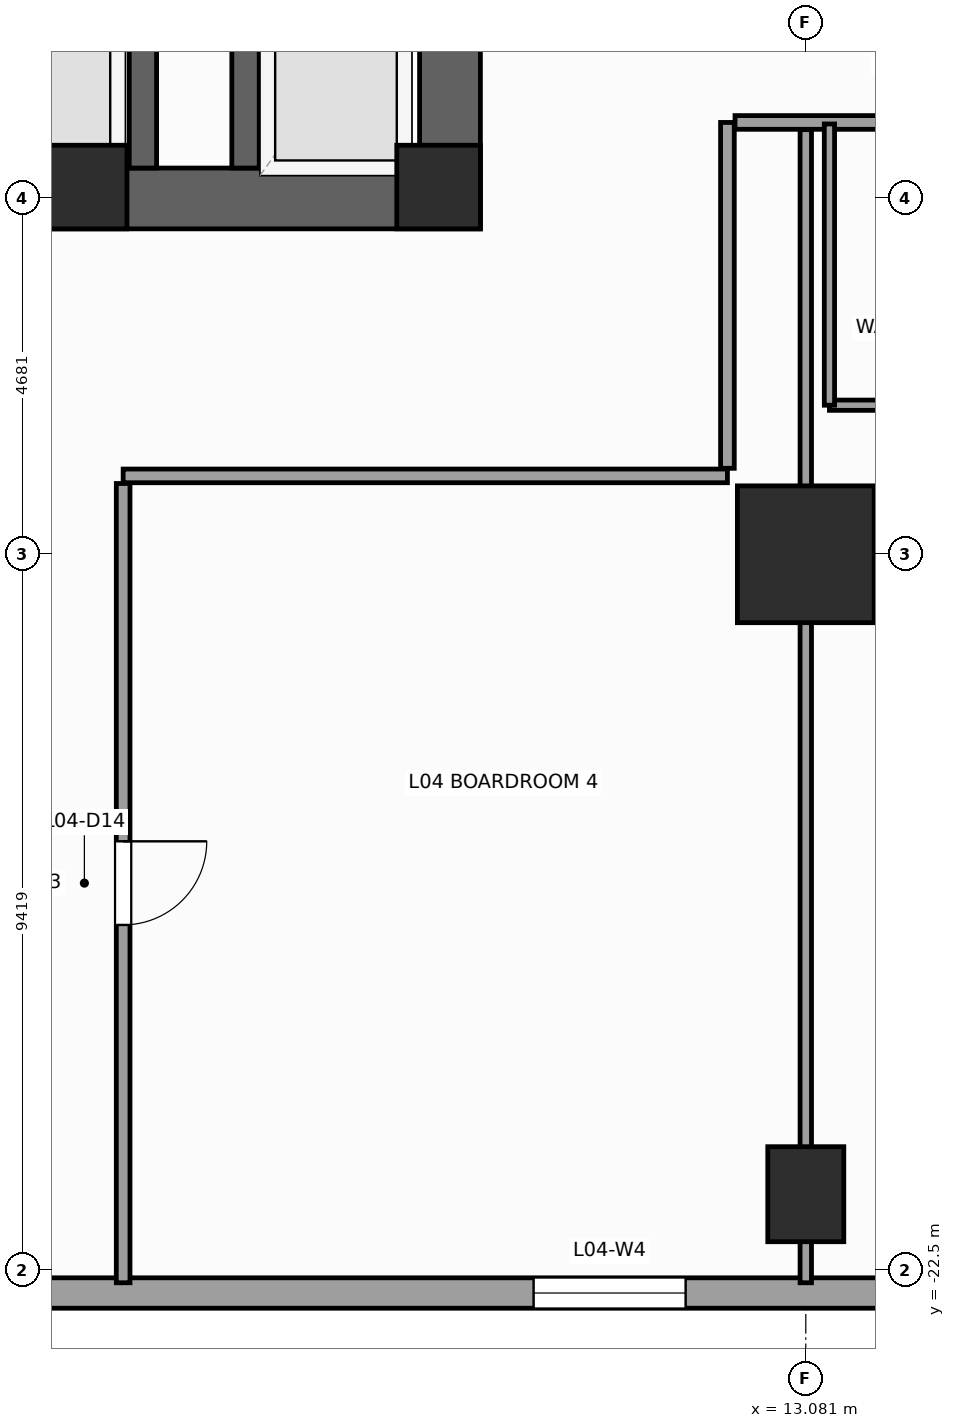
"""IFC4 building model, lengths in metres.
Left out: names, types, materials, properties, quantities, classifications, styles, units other than length and angle.
Written with IfcOpenShell. Run it as: python <this file> out.ifc"""

import sys

from ifc_helpers import new_model, si_unit, direction, frame, frame_2d, origin, origin_2d, place, context, subcontext, project, spatial, rectangle, extrude, source, transform, mapped, element, fill, save


model = new_model("IFC4")
c1 = context("Model", 3, precision=1e-05, world=origin(), true_north=direction((0.0, 1.0)))
c2 = subcontext(c1, "Body", "Model", "MODEL_VIEW")
j1 = project(units=[si_unit("LENGTHUNIT", "METRE"), si_unit("PLANEANGLEUNIT", "RADIAN")], contexts=[c1])
p1 = place(None, origin())
s1 = spatial("IfcSite", under=j1, at=p1, CompositionType="ELEMENT")
p2 = place(p1, origin())
s2 = spatial("IfcBuilding", under=s1, at=p2, CompositionType="ELEMENT")
p3 = place(p2, frame((0.0, 0.0, 21.0)))
s3 = spatial("IfcBuildingStorey", under=s2, at=p3, CompositionType="ELEMENT", Elevation=21.0)
p4 = place(p3, frame((-8.8, -8.4, 0.0), z_axis=(0.0, 0.0, 1.0), x_axis=(1.0, 0.0, 0.0)))
e1 = element("IfcWall", 1, at=p4, inside=s3, PredefinedType="SHEAR", context=c2, shape_type="SweptSolid", body=[
    extrude(rectangle(XDim=17.6, YDim=0.8, at=frame_2d((8.8, 0.0))), origin(), (0.0, 0.0, 1.0), 5.0),
])
p5 = place(p4, frame((8.15, 0.0, 0.0)))
e2 = element("IfcOpeningElement", 2, at=p5, cuts=e1, PredefinedType="OPENING", context=c2, shape_type="SweptSolid", body=[
    extrude(rectangle(XDim=1.3, YDim=2.2, at=frame_2d((0.65, 1.1))), frame((0.0, 0.41, 0.0), z_axis=(0.0, -1.0, 0.0), x_axis=(1.0, 0.0, 0.0)), (0.0, 0.0, 1.0), 0.82),
])
p6 = place(p3, frame((8.4, -8.0, 0.0), z_axis=(0.0, 0.0, 1.0), x_axis=(0.0, 1.0, 0.0)))
e3 = element("IfcWall", 3, at=p6, inside=s3, PredefinedType="SHEAR", context=c2, shape_type="SweptSolid", body=[
    extrude(rectangle(XDim=16.0, YDim=0.8, at=frame_2d((8.0, 0.0))), origin(), (0.0, 0.0, 1.0), 5.0),
])
p7 = place(p6, frame((4.69, 0.0, 0.0)))
e4 = element("IfcOpeningElement", 4, at=p7, cuts=e3, PredefinedType="OPENING", context=c2, shape_type="SweptSolid", body=[
    extrude(rectangle(XDim=1.3, YDim=2.2, at=frame_2d((0.65, 1.1))), frame((0.0, 0.41, 0.0), z_axis=(0.0, -1.0, 0.0), x_axis=(1.0, 0.0, 0.0)), (0.0, 0.0, 1.0), 0.82),
])
p8 = place(p3, frame((4.36, -8.0, 0.0), z_axis=(0.0, 0.0, 1.0), x_axis=(0.0, 1.0, 0.0)))
e5 = element("IfcWall", 5, at=p8, inside=s3, PredefinedType="SHEAR", context=c2, shape_type="SweptSolid", body=[
    extrude(rectangle(XDim=16.0, YDim=0.36, at=frame_2d((8.0, 0.0))), origin(), (0.0, 0.0, 1.0), 5.0),
])
p9 = place(p3, frame((5.71, -8.0, 0.0), z_axis=(0.0, 0.0, 1.0), x_axis=(0.0, 1.0, 0.0)))
e6 = element("IfcWall", 6, at=p9, inside=s3, PredefinedType="SHEAR", context=c2, shape_type="SweptSolid", body=[
    extrude(rectangle(XDim=2.54, YDim=0.36, at=frame_2d((1.27, 0.0))), origin(), (0.0, 0.0, 1.0), 5.0),
])
m1 = source(origin(), c2, "Body", "SweptSolid", [
    extrude(rectangle(XDim=1.1, YDim=1.1, at=origin_2d()), origin(), (0.0, 0.0, 1.0), 5.0),
])
for number, where, z_axis, x_axis in (
    (7, (8.25, -8.25, 0.0), (0.0, 0.0, 1.0), (1.0, 0.0, 0.0)),
    (8, (3.6, -8.25, 0.0), (0.0, 0.0, 1.0), (1.0, 0.0, 0.0)),
):
    element("IfcColumn", number, at=place(p3, frame(where, z_axis=z_axis, x_axis=x_axis)), inside=s3, PredefinedType="PILASTER", context=c2, shape_type="MappedRepresentation", body=[
        mapped(m1, transform((0.0, 0.0, 0.0), scale=1.0)),
    ])
m2 = source(origin(), c2, "Body", "SweptSolid", [
    extrude(rectangle(XDim=1.8, YDim=1.8, at=origin_2d()), origin(), (0.0, 0.0, 1.0), 5.0),
])
p10 = place(p3, frame((13.081, -13.081, 0.0), z_axis=(0.0, 0.0, 1.0), x_axis=(1.0, 0.0, 0.0)))
e9 = element("IfcColumn", 9, at=p10, inside=s3, PredefinedType="COLUMN", context=c2, shape_type="MappedRepresentation", body=[
    mapped(m2, transform((0.0, 0.0, 0.0), scale=1.0)),
])
m3 = source(origin(), c2, "Body", "SweptSolid", [
    extrude(rectangle(XDim=1.0, YDim=1.25, at=origin_2d()), origin(), (0.0, 0.0, 1.0), 5.0),
])
p11 = place(p3, frame((13.081, -21.5, 0.0), z_axis=(0.0, 0.0, 1.0), x_axis=(1.0, 0.0, 0.0)))
e10 = element("IfcColumn", 10, at=p11, inside=s3, PredefinedType="COLUMN", context=c2, shape_type="MappedRepresentation", body=[
    mapped(m3, transform((0.0, 0.0, 0.0), scale=1.0)),
])
p12 = place(p3, frame((0.0, -22.8, 0.0), z_axis=(0.0, 0.0, 1.0), x_axis=(1.0, 0.0, 0.0)))
e11 = element("IfcWall", 11, at=p12, inside=s3, PredefinedType="STANDARD", context=c2, shape_type="SweptSolid", body=[
    extrude(rectangle(XDim=31.0, YDim=0.4, at=frame_2d((15.5, 0.0))), origin(), (0.0, 0.0, 1.0), 4.72),
])
p13 = place(p12, frame((9.5, 0.0, 0.65)))
e12 = element("IfcOpeningElement", 12, at=p13, cuts=e11, PredefinedType="OPENING", context=c2, shape_type="SweptSolid", body=[
    extrude(rectangle(XDim=2.0, YDim=1.45, at=frame_2d((1.0, 0.725))), frame((0.0, 0.21, 0.0), z_axis=(0.0, -1.0, 0.0), x_axis=(1.0, 0.0, 0.0)), (0.0, 0.0, 1.0), 0.42),
])
p14 = place(p12, frame((15.0, 0.0, 0.65)))
e13 = element("IfcOpeningElement", 13, at=p14, cuts=e11, PredefinedType="OPENING", context=c2, shape_type="SweptSolid", body=[
    extrude(rectangle(XDim=2.0, YDim=1.45, at=frame_2d((1.0, 0.725))), frame((0.0, 0.21, 0.0), z_axis=(0.0, -1.0, 0.0), x_axis=(1.0, 0.0, 0.0)), (0.0, 0.0, 1.0), 0.42),
])
p15 = place(p12, frame((20.0, 0.0, 0.65)))
e14 = element("IfcOpeningElement", 14, at=p15, cuts=e11, PredefinedType="OPENING", context=c2, shape_type="SweptSolid", body=[
    extrude(rectangle(XDim=2.0, YDim=1.45, at=frame_2d((1.0, 0.725))), frame((0.0, 0.21, 0.0), z_axis=(0.0, -1.0, 0.0), x_axis=(1.0, 0.0, 0.0)), (0.0, 0.0, 1.0), 0.42),
])
p16 = place(p3, frame((4.1, -12.05, 0.0), z_axis=(0.0, 0.0, 1.0), x_axis=(1.0, 0.0, 0.0)))
e15 = element("IfcWall", 15, at=p16, inside=s3, PredefinedType="PARTITIONING", context=c2, shape_type="SweptSolid", body=[
    extrude(rectangle(XDim=7.95, YDim=0.18, at=frame_2d((3.975, 0.0))), origin(), (0.0, 0.0, 1.0), 4.72),
])
p17 = place(p3, frame((12.05, -11.95, 0.0), z_axis=(0.0, 0.0, 1.0), x_axis=(0.0, 1.0, 0.0)))
e16 = element("IfcWall", 16, at=p17, inside=s3, PredefinedType="PARTITIONING", context=c2, shape_type="SweptSolid", body=[
    extrude(rectangle(XDim=4.55, YDim=0.18, at=frame_2d((2.275, 0.0))), origin(), (0.0, 0.0, 1.0), 4.72),
])
p18 = place(p3, frame((12.15, -7.4, 0.0), z_axis=(0.0, 0.0, 1.0), x_axis=(1.0, 0.0, 0.0)))
e17 = element("IfcWall", 17, at=p18, inside=s3, PredefinedType="PARTITIONING", context=c2, shape_type="SweptSolid", body=[
    extrude(rectangle(XDim=18.515, YDim=0.18, at=frame_2d((9.258, 0.0))), origin(), (0.0, 0.0, 1.0), 4.72),
])
p19 = place(p18, frame((1.892, 0.0, 0.0)))
e18 = element("IfcOpeningElement", 18, at=p19, cuts=e17, PredefinedType="OPENING", context=c2, shape_type="SweptSolid", body=[
    extrude(rectangle(XDim=0.95, YDim=2.1, at=frame_2d((0.475, 1.05))), frame((0.0, 0.1, 0.0), z_axis=(0.0, -1.0, 0.0), x_axis=(1.0, 0.0, 0.0)), (0.0, 0.0, 1.0), 0.2),
])
p20 = place(p18, frame((10.283, 0.0, 0.0)))
e19 = element("IfcOpeningElement", 19, at=p20, cuts=e17, PredefinedType="OPENING", context=c2, shape_type="SweptSolid", body=[
    extrude(rectangle(XDim=1.1, YDim=2.2, at=frame_2d((0.55, 1.1))), frame((0.0, 0.1, 0.0), z_axis=(0.0, -1.0, 0.0), x_axis=(1.0, 0.0, 0.0)), (0.0, 0.0, 1.0), 0.2),
])
p21 = place(p3, frame((4.1, -22.665, 0.0), z_axis=(0.0, 0.0, 1.0), x_axis=(0.0, 1.0, 0.0)))
e20 = element("IfcWall", 20, at=p21, inside=s3, PredefinedType="PARTITIONING", context=c2, shape_type="SweptSolid", body=[
    extrude(rectangle(XDim=10.515, YDim=0.18, at=frame_2d((5.258, 0.0))), origin(), (0.0, 0.0, 1.0), 4.72),
])
p22 = place(p21, frame((4.708, 0.0, 0.0)))
e21 = element("IfcOpeningElement", 21, at=p22, cuts=e20, PredefinedType="OPENING", context=c2, shape_type="SweptSolid", body=[
    extrude(rectangle(XDim=1.1, YDim=2.2, at=frame_2d((0.55, 1.1))), frame((0.0, 0.1, 0.0), z_axis=(0.0, -1.0, 0.0), x_axis=(1.0, 0.0, 0.0)), (0.0, 0.0, 1.0), 0.2),
])
p23 = place(p3, frame((13.081, -22.665, 0.0), z_axis=(0.0, 0.0, 1.0), x_axis=(0.0, 1.0, 0.0)))
e22 = element("IfcWall", 22, at=p23, inside=s3, PredefinedType="PARTITIONING", context=c2, shape_type="SweptSolid", body=[
    extrude(rectangle(XDim=15.17, YDim=0.15, at=frame_2d((7.585, 0.0))), origin(), (0.0, 0.0, 1.0), 2.88),
])
p24 = place(p3, frame((13.392, -11.12, 0.0), z_axis=(0.0, 0.0, 1.0), x_axis=(1.0, 0.0, 0.0)))
e23 = element("IfcWall", 23, at=p24, inside=s3, PredefinedType="PARTITIONING", context=c2, shape_type="SweptSolid", body=[
    extrude(rectangle(XDim=2.25, YDim=0.135, at=frame_2d((1.125, 0.0))), origin(), (0.0, 0.0, 1.0), 4.72),
])
p25 = place(p3, frame((13.392, -11.12, 0.0), z_axis=(0.0, 0.0, 1.0), x_axis=(0.0, 1.0, 0.0)))
e24 = element("IfcWall", 24, at=p25, inside=s3, PredefinedType="PARTITIONING", context=c2, shape_type="SweptSolid", body=[
    extrude(rectangle(XDim=3.7, YDim=0.135, at=frame_2d((1.85, 0.0))), origin(), (0.0, 0.0, 1.0), 3.56),
])
m4 = source(origin(), c2, "Body", "SweptSolid", [
    extrude(rectangle(XDim=2.0, YDim=1.45, at=frame_2d((1.0, 0.725))), frame((0.0, 0.03, 0.0), z_axis=(0.0, -1.0, 0.0), x_axis=(1.0, 0.0, 0.0)), (0.0, 0.0, 1.0), 0.06),
])
p26 = place(p13, origin())
e25 = element("IfcWindow", 25, at=p26, inside=s3, PartitioningType="SINGLE_PANEL", PredefinedType="WINDOW", context=c2, shape_type="MappedRepresentation", body=[
    mapped(m4, transform((0.0, 0.0, 0.0), scale=1.0)),
])
fill(e12, e25)
m5 = source(origin(), c2, "Body", "SweptSolid", [
    extrude(rectangle(XDim=1.1, YDim=2.2, at=frame_2d((0.55, 1.1))), frame((0.0, 0.025, 0.0), z_axis=(0.0, -1.0, 0.0), x_axis=(1.0, 0.0, 0.0)), (0.0, 0.0, 1.0), 0.05),
])
p27 = place(p22, frame((1.1, 0.0, 0.0), z_axis=(0.0, 0.0, 1.0), x_axis=(-1.0, 0.0, 0.0)))
e26 = element("IfcDoor", 26, at=p27, inside=s3, OperationType="SINGLE_SWING_RIGHT", PredefinedType="DOOR", context=c2, shape_type="MappedRepresentation", body=[
    mapped(m5, transform((0.0, 0.0, 0.0), scale=1.0)),
])
fill(e21, e26)
save(model, sys.argv[1])
